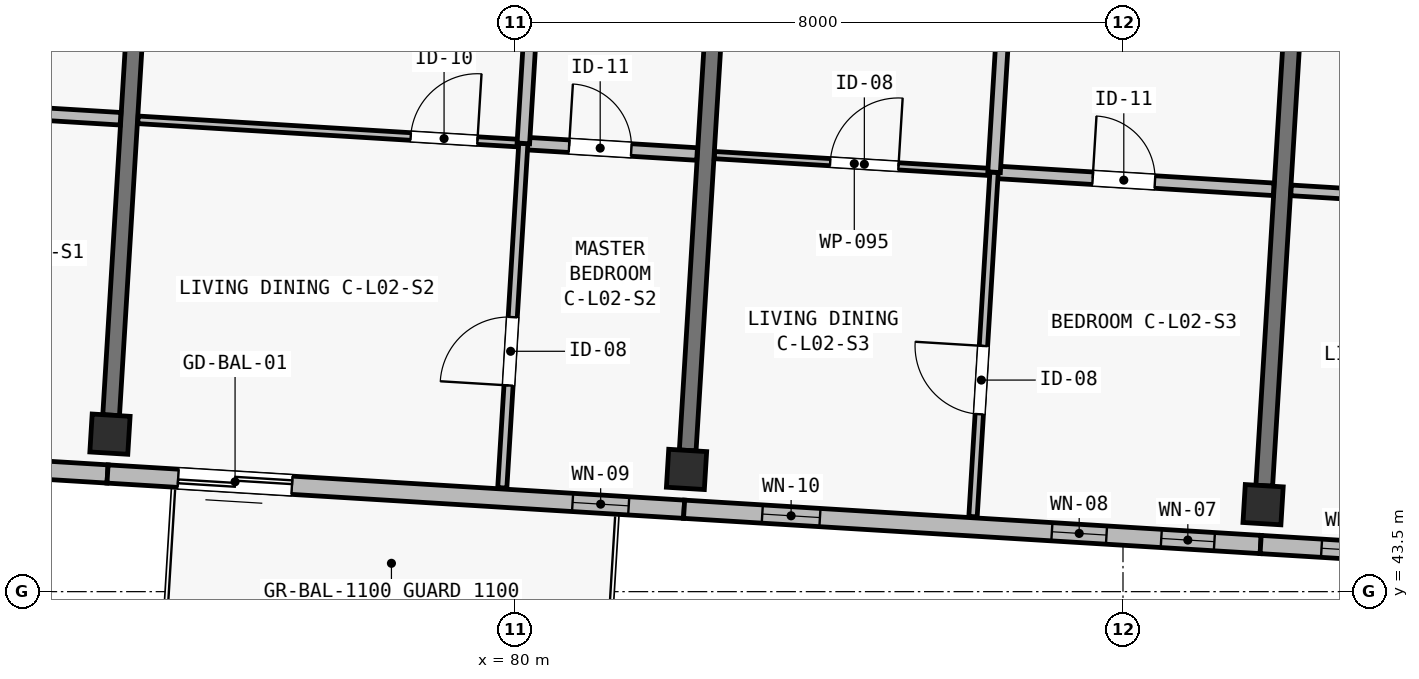
"""IFC4 building model, lengths in metres.
Left out: names, types, materials, properties, quantities, classifications, styles, units other than length and angle.
Written with IfcOpenShell. Run it as: python <this file> out.ifc"""

import sys

from ifc_helpers import new_model, si_unit, direction, frame, frame_2d, origin, origin_2d, place, context, subcontext, project, spatial, rectangle, extrude, element, fill, save


model = new_model("IFC4")
c1 = context("Model", 3, precision=1e-05, world=origin(), true_north=direction((0.0, 1.0)))
c2 = subcontext(c1, "Body", "Model", "MODEL_VIEW")
j1 = project(units=[si_unit("LENGTHUNIT", "METRE"), si_unit("PLANEANGLEUNIT", "RADIAN")], contexts=[c1])
p1 = place(None, origin())
s1 = spatial("IfcSite", under=j1, at=p1, CompositionType="ELEMENT")
p2 = place(p1, origin())
s2 = spatial("IfcBuilding", under=s1, at=p2, CompositionType="ELEMENT")
p3 = place(p2, frame((0.0, 0.0, 8.4)))
s3 = spatial("IfcBuildingStorey", under=s2, at=p3, CompositionType="ELEMENT", Elevation=8.4)
for number, where, z_axis, x_axis in (
    (1, (74.672, 45.572, 0.0), (0.0, 0.0, 1.0), (0.998, -0.061, 0.0)),
    (2, (82.258, 45.108, 0.0), (0.0, 0.0, 1.0), (0.998, -0.061, 0.0)),
    (3, (89.843, 44.644, 0.0), (0.0, 0.0, 1.0), (0.998, -0.061, 0.0)),
):
    element("IfcColumn", number, at=place(p3, frame(where, z_axis=z_axis, x_axis=x_axis)), inside=s3, PredefinedType="COLUMN", context=c2, shape_type="SweptSolid", body=[
        extrude(rectangle(XDim=0.5, YDim=0.5, at=origin_2d()), origin(), (0.0, 0.0, 1.0), 3.25),
    ])
p4 = place(p3, frame((74.687, 45.822, 0.0), z_axis=(0.0, 0.0, 1.0), x_axis=(0.061033859059, 0.99813569621, 0.0)))
e4 = element("IfcWall", 4, at=p4, inside=s3, PredefinedType="SHEAR", context=c2, shape_type="SweptSolid", body=[
    extrude(rectangle(XDim=7.1, YDim=0.22, at=frame_2d((3.55, 0.0))), origin(), (0.0, 0.0, 1.0), 2.5),
])
p5 = place(p3, frame((82.273, 45.358, 0.0), z_axis=(0.0, 0.0, 1.0), x_axis=(0.061070212127, 0.998133472633, 0.0)))
e5 = element("IfcWall", 5, at=p5, inside=s3, PredefinedType="SHEAR", context=c2, shape_type="SweptSolid", body=[
    extrude(rectangle(XDim=7.1, YDim=0.22, at=frame_2d((3.55, 0.0))), origin(), (0.0, 0.0, 1.0), 2.5),
])
p6 = place(p3, frame((89.859, 44.894, 0.0), z_axis=(0.0, 0.0, 1.0), x_axis=(0.061033859059, 0.99813569621, 0.0)))
e6 = element("IfcWall", 6, at=p6, inside=s3, PredefinedType="SHEAR", context=c2, shape_type="SweptSolid", body=[
    extrude(rectangle(XDim=7.1, YDim=0.22, at=frame_2d((3.55, 0.0))), origin(), (0.0, 0.0, 1.0), 2.5),
])
p7 = place(p3, frame((74.64, 45.048, 0.0), z_axis=(0.0, 0.0, 1.0), x_axis=(-0.998135669243, 0.061034300063, 0.0)))
e7 = element("IfcWall", 7, at=p7, inside=s3, PredefinedType="SOLIDWALL", context=c2, shape_type="SweptSolid", body=[
    extrude(rectangle(XDim=7.6, YDim=0.24, at=frame_2d((3.8, 0.0))), origin(), (0.0, 0.0, 1.0), 3.0),
])
p8 = place(p7, frame((1.749, 0.0, 0.42)))
e8 = element("IfcOpeningElement", 8, at=p8, cuts=e7, PredefinedType="OPENING", context=c2, shape_type="SweptSolid", body=[
    extrude(rectangle(XDim=0.8, YDim=2.3, at=frame_2d((0.4, 1.15))), frame((0.0, 0.135, 0.0), z_axis=(0.0, -1.0, 0.0), x_axis=(1.0, 0.0, 0.0)), (0.0, 0.0, 1.0), 0.27),
])
p9 = place(p7, frame((5.04, 0.0, 0.42)))
e9 = element("IfcOpeningElement", 9, at=p9, cuts=e7, PredefinedType="OPENING", context=c2, shape_type="SweptSolid", body=[
    extrude(rectangle(XDim=0.86, YDim=2.36, at=frame_2d((0.43, 1.18))), frame((0.0, 0.135, 0.0), z_axis=(0.0, -1.0, 0.0), x_axis=(1.0, 0.0, 0.0)), (0.0, 0.0, 1.0), 0.27),
])
p10 = place(p3, frame((82.225, 44.584, 0.0), z_axis=(0.0, 0.0, 1.0), x_axis=(-0.998133591969, 0.061068261669, 0.0)))
e10 = element("IfcWall", 10, at=p10, inside=s3, PredefinedType="SOLIDWALL", context=c2, shape_type="SweptSolid", body=[
    extrude(rectangle(XDim=7.6, YDim=0.24, at=frame_2d((3.8, 0.0))), origin(), (0.0, 0.0, 1.0), 3.0),
])
p11 = place(p10, frame((5.169, 0.0, 0.0)))
e11 = element("IfcOpeningElement", 11, at=p11, cuts=e10, PredefinedType="OPENING", context=c2, shape_type="SweptSolid", body=[
    extrude(rectangle(XDim=1.5, YDim=2.12, at=frame_2d((0.75, 1.06))), frame((0.0, 0.135, 0.0), z_axis=(0.0, -1.0, 0.0), x_axis=(1.0, 0.0, 0.0)), (0.0, 0.0, 1.0), 0.27),
])
p12 = place(p10, frame((0.73, 0.0, 0.46)))
e12 = element("IfcOpeningElement", 12, at=p12, cuts=e10, PredefinedType="OPENING", context=c2, shape_type="SweptSolid", body=[
    extrude(rectangle(XDim=0.74, YDim=2.26, at=frame_2d((0.37, 1.13))), frame((0.0, 0.135, 0.0), z_axis=(0.0, -1.0, 0.0), x_axis=(1.0, 0.0, 0.0)), (0.0, 0.0, 1.0), 0.27),
])
p13 = place(p3, frame((89.811, 44.12, 0.0), z_axis=(0.0, 0.0, 1.0), x_axis=(-0.998135669243, 0.061034300063, 0.0)))
e13 = element("IfcWall", 13, at=p13, inside=s3, PredefinedType="SOLIDWALL", context=c2, shape_type="SweptSolid", body=[
    extrude(rectangle(XDim=7.6, YDim=0.24, at=frame_2d((3.8, 0.0))), origin(), (0.0, 0.0, 1.0), 3.0),
])
p14 = place(p13, frame((0.61, 0.0, 0.5)))
e14 = element("IfcOpeningElement", 14, at=p14, cuts=e13, PredefinedType="OPENING", context=c2, shape_type="SweptSolid", body=[
    extrude(rectangle(XDim=0.7, YDim=2.36, at=frame_2d((0.35, 1.18))), frame((0.0, 0.135, 0.0), z_axis=(0.0, -1.0, 0.0), x_axis=(1.0, 0.0, 0.0)), (0.0, 0.0, 1.0), 0.27),
])
p15 = place(p13, frame((2.032, 0.0, 0.42)))
e15 = element("IfcOpeningElement", 15, at=p15, cuts=e13, PredefinedType="OPENING", context=c2, shape_type="SweptSolid", body=[
    extrude(rectangle(XDim=0.72, YDim=2.16, at=frame_2d((0.36, 1.08))), frame((0.0, 0.135, 0.0), z_axis=(0.0, -1.0, 0.0), x_axis=(1.0, 0.0, 0.0)), (0.0, 0.0, 1.0), 0.27),
])
p16 = place(p13, frame((5.809, 0.0, 0.52)))
e16 = element("IfcOpeningElement", 16, at=p16, cuts=e13, PredefinedType="OPENING", context=c2, shape_type="SweptSolid", body=[
    extrude(rectangle(XDim=0.76, YDim=2.34, at=frame_2d((0.38, 1.17))), frame((0.0, 0.135, 0.0), z_axis=(0.0, -1.0, 0.0), x_axis=(1.0, 0.0, 0.0)), (0.0, 0.0, 1.0), 0.27),
])
p17 = place(p3, frame((97.397, 43.656, 0.0), z_axis=(0.0, 0.0, 1.0), x_axis=(-0.998135549572, 0.061036257095, 0.0)))
e17 = element("IfcWall", 17, at=p17, inside=s3, PredefinedType="SOLIDWALL", context=c2, shape_type="SweptSolid", body=[
    extrude(rectangle(XDim=7.6, YDim=0.24, at=frame_2d((3.8, 0.0))), origin(), (0.0, 0.0, 1.0), 3.0),
])
p18 = place(p17, frame((1.544, 0.0, 0.42)))
e18 = element("IfcOpeningElement", 18, at=p18, cuts=e17, PredefinedType="OPENING", context=c2, shape_type="SweptSolid", body=[
    extrude(rectangle(XDim=0.8, YDim=2.3, at=frame_2d((0.4, 1.15))), frame((0.0, 0.135, 0.0), z_axis=(0.0, -1.0, 0.0), x_axis=(1.0, 0.0, 0.0)), (0.0, 0.0, 1.0), 0.27),
])
p19 = place(p17, frame((5.938, 0.0, 0.42)))
e19 = element("IfcOpeningElement", 19, at=p19, cuts=e17, PredefinedType="OPENING", context=c2, shape_type="SweptSolid", body=[
    extrude(rectangle(XDim=0.86, YDim=2.36, at=frame_2d((0.43, 1.18))), frame((0.0, 0.135, 0.0), z_axis=(0.0, -1.0, 0.0), x_axis=(1.0, 0.0, 0.0)), (0.0, 0.0, 1.0), 0.27),
])
p20 = place(p3, frame((71.132, 49.946, 0.0), z_axis=(0.0, 0.0, 1.0), x_axis=(0.998136719672, -0.061017119263, 0.0)))
e20 = element("IfcWall", 20, at=p20, inside=s3, PredefinedType="PLUMBINGWALL", context=c2, shape_type="SweptSolid", body=[
    extrude(rectangle(XDim=3.685, YDim=0.165, at=frame_2d((1.843, 0.0))), origin(), (0.0, 0.0, 1.0), 2.97),
])
p21 = place(p20, frame((1.3, 0.0, 0.0)))
e21 = element("IfcOpeningElement", 21, at=p21, cuts=e20, PredefinedType="OPENING", context=c2, shape_type="SweptSolid", body=[
    extrude(rectangle(XDim=0.82, YDim=2.08, at=frame_2d((0.41, 1.04))), frame((0.0, 0.097, 0.0), z_axis=(0.0, -1.0, 0.0), x_axis=(1.0, 0.0, 0.0)), (0.0, 0.0, 1.0), 0.195),
])
p22 = place(p3, frame((75.04, 49.707, 0.0), z_axis=(0.0, 0.0, 1.0), x_axis=(0.998135637207, -0.061034823981, 0.0)))
e22 = element("IfcWall", 22, at=p22, inside=s3, PredefinedType="PARTITIONING", context=c2, shape_type="SweptSolid", body=[
    extrude(rectangle(XDim=5.08, YDim=0.1, at=frame_2d((2.54, 0.0))), origin(), (0.0, 0.0, 1.0), 2.97),
])
p23 = place(p22, frame((3.595, 0.0, 0.0)))
e23 = element("IfcOpeningElement", 23, at=p23, cuts=e22, PredefinedType="OPENING", context=c2, shape_type="SweptSolid", body=[
    extrude(rectangle(XDim=0.88, YDim=2.1, at=frame_2d((0.44, 1.05))), frame((0.0, 0.065, 0.0), z_axis=(0.0, -1.0, 0.0), x_axis=(1.0, 0.0, 0.0)), (0.0, 0.0, 1.0), 0.13),
])
p24 = place(p3, frame((80.11, 49.397, 0.0), z_axis=(0.0, 0.0, 1.0), x_axis=(0.99813222782, -0.061090553999, 0.0)))
e24 = element("IfcWall", 24, at=p24, inside=s3, PredefinedType="PLUMBINGWALL", context=c2, shape_type="SweptSolid", body=[
    extrude(rectangle(XDim=2.29, YDim=0.165, at=frame_2d((1.145, 0.0))), origin(), (0.0, 0.0, 1.0), 2.97),
])
p25 = place(p24, frame((0.603, 0.0, 0.0)))
e25 = element("IfcOpeningElement", 25, at=p25, cuts=e24, PredefinedType="OPENING", context=c2, shape_type="SweptSolid", body=[
    extrude(rectangle(XDim=0.82, YDim=2.08, at=frame_2d((0.41, 1.04))), frame((0.0, 0.097, 0.0), z_axis=(0.0, -1.0, 0.0), x_axis=(1.0, 0.0, 0.0)), (0.0, 0.0, 1.0), 0.195),
])
p26 = place(p3, frame((79.833, 44.866, 0.0), z_axis=(0.0, 0.0, 1.0), x_axis=(0.061035713941, 0.998135582786, 0.0)))
e26 = element("IfcWall", 26, at=p26, inside=s3, PredefinedType="PARTITIONING", context=c2, shape_type="SweptSolid", body=[
    extrude(rectangle(XDim=4.54, YDim=0.12, at=frame_2d((2.27, 0.0))), origin(), (0.0, 0.0, 1.0), 2.97),
])
p27 = place(p26, frame((1.35, 0.0, 0.0)))
e27 = element("IfcOpeningElement", 27, at=p27, cuts=e26, PredefinedType="OPENING", context=c2, shape_type="SweptSolid", body=[
    extrude(rectangle(XDim=0.9, YDim=2.1, at=frame_2d((0.45, 1.05))), frame((0.0, 0.075, 0.0), z_axis=(0.0, -1.0, 0.0), x_axis=(1.0, 0.0, 0.0)), (0.0, 0.0, 1.0), 0.15),
])
p28 = place(p3, frame((80.11, 49.397, 0.0), z_axis=(0.0, 0.0, 1.0), x_axis=(0.061066453301, 0.998133702608, 0.0)))
e28 = element("IfcWall", 28, at=p28, inside=s3, PredefinedType="PLUMBINGWALL", context=c2, shape_type="SweptSolid", body=[
    extrude(rectangle(XDim=3.87, YDim=0.165, at=frame_2d((1.935, 0.0))), origin(), (0.0, 0.0, 1.0), 2.97),
])
p29 = place(p3, frame((82.625, 49.243, 0.0), z_axis=(0.0, 0.0, 1.0), x_axis=(0.998132682596, -0.061083123148, 0.0)))
e29 = element("IfcWall", 29, at=p29, inside=s3, PredefinedType="PARTITIONING", context=c2, shape_type="SweptSolid", body=[
    extrude(rectangle(XDim=3.685, YDim=0.095, at=frame_2d((1.843, 0.0))), origin(), (0.0, 0.0, 1.0), 2.97),
])
p30 = place(p29, frame((1.525, 0.0, 0.0)))
e30 = element("IfcOpeningElement", 30, at=p30, cuts=e29, PredefinedType="OPENING", context=c2, shape_type="SweptSolid", body=[
    extrude(rectangle(XDim=0.9, YDim=2.1, at=frame_2d((0.45, 1.05))), frame((0.0, 0.062, 0.0), z_axis=(0.0, -1.0, 0.0), x_axis=(1.0, 0.0, 0.0)), (0.0, 0.0, 1.0), 0.125),
])
p31 = place(p3, frame((86.304, 49.018, 0.0), z_axis=(0.0, 0.0, 1.0), x_axis=(0.998136719672, -0.061017119263, 0.0)))
e31 = element("IfcWall", 31, at=p31, inside=s3, PredefinedType="PLUMBINGWALL", context=c2, shape_type="SweptSolid", body=[
    extrude(rectangle(XDim=3.685, YDim=0.165, at=frame_2d((1.843, 0.0))), origin(), (0.0, 0.0, 1.0), 2.97),
])
p32 = place(p31, frame((1.3, 0.0, 0.0)))
e32 = element("IfcOpeningElement", 32, at=p32, cuts=e31, PredefinedType="OPENING", context=c2, shape_type="SweptSolid", body=[
    extrude(rectangle(XDim=0.82, YDim=2.08, at=frame_2d((0.41, 1.04))), frame((0.0, 0.097, 0.0), z_axis=(0.0, -1.0, 0.0), x_axis=(1.0, 0.0, 0.0)), (0.0, 0.0, 1.0), 0.195),
])
p33 = place(p3, frame((86.027, 44.487, 0.0), z_axis=(0.0, 0.0, 1.0), x_axis=(0.061035713941, 0.998135582786, 0.0)))
e33 = element("IfcWall", 33, at=p33, inside=s3, PredefinedType="PARTITIONING", context=c2, shape_type="SweptSolid", body=[
    extrude(rectangle(XDim=4.54, YDim=0.11, at=frame_2d((2.27, 0.0))), origin(), (0.0, 0.0, 1.0), 2.97),
])
p34 = place(p33, frame((1.35, 0.0, 0.0)))
e34 = element("IfcOpeningElement", 34, at=p34, cuts=e33, PredefinedType="OPENING", context=c2, shape_type="SweptSolid", body=[
    extrude(rectangle(XDim=0.9, YDim=2.1, at=frame_2d((0.45, 1.05))), frame((0.0, 0.07, 0.0), z_axis=(0.0, -1.0, 0.0), x_axis=(1.0, 0.0, 0.0)), (0.0, 0.0, 1.0), 0.14),
])
p35 = place(p3, frame((86.304, 49.018, 0.0), z_axis=(0.0, 0.0, 1.0), x_axis=(0.061066453301, 0.998133702608, 0.0)))
e35 = element("IfcWall", 35, at=p35, inside=s3, PredefinedType="PLUMBINGWALL", context=c2, shape_type="SweptSolid", body=[
    extrude(rectangle(XDim=3.87, YDim=0.165, at=frame_2d((1.935, 0.0))), origin(), (0.0, 0.0, 1.0), 2.97),
])
p36 = place(p3, frame((90.211, 48.779, 0.0), z_axis=(0.0, 0.0, 1.0), x_axis=(0.998136719672, -0.061017119263, 0.0)))
e36 = element("IfcWall", 36, at=p36, inside=s3, PredefinedType="PARTITIONING", context=c2, shape_type="SweptSolid", body=[
    extrude(rectangle(XDim=3.685, YDim=0.14, at=frame_2d((1.843, 0.0))), origin(), (0.0, 0.0, 1.0), 2.97),
])
p37 = place(p36, frame((1.525, 0.0, 0.0)))
e37 = element("IfcOpeningElement", 37, at=p37, cuts=e36, PredefinedType="OPENING", context=c2, shape_type="SweptSolid", body=[
    extrude(rectangle(XDim=0.9, YDim=2.1, at=frame_2d((0.45, 1.05))), frame((0.0, 0.085, 0.0), z_axis=(0.0, -1.0, 0.0), x_axis=(1.0, 0.0, 0.0)), (0.0, 0.0, 1.0), 0.17),
])
p38 = place(p11, origin())
e38 = element("IfcDoor", 38, at=p38, inside=s3, OperationType="SLIDING_TO_RIGHT", PredefinedType="DOOR", context=c2, shape_type="SweptSolid", body=[
    extrude(rectangle(XDim=1.5, YDim=2.12, at=frame_2d((0.75, 1.06))), frame((0.0, 0.025, 0.0), z_axis=(0.0, -1.0, 0.0), x_axis=(1.0, 0.0, 0.0)), (0.0, 0.0, 1.0), 0.05),
])
fill(e11, e38)
p39 = place(p12, origin())
e39 = element("IfcWindow", 39, at=p39, inside=s3, PartitioningType="SINGLE_PANEL", PredefinedType="WINDOW", context=c2, shape_type="SweptSolid", body=[
    extrude(rectangle(XDim=0.74, YDim=2.26, at=frame_2d((0.37, 1.13))), frame((0.0, 0.03, 0.0), z_axis=(0.0, -1.0, 0.0), x_axis=(1.0, 0.0, 0.0)), (0.0, 0.0, 1.0), 0.06),
])
fill(e12, e39)
p40 = place(p14, origin())
e40 = element("IfcWindow", 40, at=p40, inside=s3, PartitioningType="SINGLE_PANEL", PredefinedType="WINDOW", context=c2, shape_type="SweptSolid", body=[
    extrude(rectangle(XDim=0.7, YDim=2.36, at=frame_2d((0.35, 1.18))), frame((0.0, 0.03, 0.0), z_axis=(0.0, -1.0, 0.0), x_axis=(1.0, 0.0, 0.0)), (0.0, 0.0, 1.0), 0.06),
])
fill(e14, e40)
p41 = place(p15, origin())
e41 = element("IfcWindow", 41, at=p41, inside=s3, PartitioningType="SINGLE_PANEL", PredefinedType="WINDOW", context=c2, shape_type="SweptSolid", body=[
    extrude(rectangle(XDim=0.72, YDim=2.16, at=frame_2d((0.36, 1.08))), frame((0.0, 0.03, 0.0), z_axis=(0.0, -1.0, 0.0), x_axis=(1.0, 0.0, 0.0)), (0.0, 0.0, 1.0), 0.06),
])
fill(e15, e41)
p42 = place(p16, origin())
e42 = element("IfcWindow", 42, at=p42, inside=s3, PartitioningType="SINGLE_PANEL", PredefinedType="WINDOW", context=c2, shape_type="SweptSolid", body=[
    extrude(rectangle(XDim=0.76, YDim=2.34, at=frame_2d((0.38, 1.17))), frame((0.0, 0.03, 0.0), z_axis=(0.0, -1.0, 0.0), x_axis=(1.0, 0.0, 0.0)), (0.0, 0.0, 1.0), 0.06),
])
fill(e16, e42)
p43 = place(p19, origin())
e43 = element("IfcWindow", 43, at=p43, inside=s3, PartitioningType="SINGLE_PANEL", PredefinedType="WINDOW", context=c2, shape_type="SweptSolid", body=[
    extrude(rectangle(XDim=0.86, YDim=2.36, at=frame_2d((0.43, 1.18))), frame((0.0, 0.03, 0.0), z_axis=(0.0, -1.0, 0.0), x_axis=(1.0, 0.0, 0.0)), (0.0, 0.0, 1.0), 0.06),
])
fill(e19, e43)
p44 = place(p23, origin())
e44 = element("IfcDoor", 44, at=p44, inside=s3, OperationType="SINGLE_SWING_RIGHT", PredefinedType="DOOR", context=c2, shape_type="SweptSolid", body=[
    extrude(rectangle(XDim=0.88, YDim=2.1, at=frame_2d((0.44, 1.05))), frame((0.0, 0.025, 0.0), z_axis=(0.0, -1.0, 0.0), x_axis=(1.0, 0.0, 0.0)), (0.0, 0.0, 1.0), 0.05),
])
fill(e23, e44)
p45 = place(p25, origin())
e45 = element("IfcDoor", 45, at=p45, inside=s3, OperationType="SINGLE_SWING_LEFT", PredefinedType="DOOR", context=c2, shape_type="SweptSolid", body=[
    extrude(rectangle(XDim=0.82, YDim=2.08, at=frame_2d((0.41, 1.04))), frame((0.0, 0.025, 0.0), z_axis=(0.0, -1.0, 0.0), x_axis=(1.0, 0.0, 0.0)), (0.0, 0.0, 1.0), 0.05),
])
fill(e25, e45)
p46 = place(p27, origin())
e46 = element("IfcDoor", 46, at=p46, inside=s3, OperationType="SINGLE_SWING_LEFT", PredefinedType="DOOR", context=c2, shape_type="SweptSolid", body=[
    extrude(rectangle(XDim=0.9, YDim=2.1, at=frame_2d((0.45, 1.05))), frame((0.0, 0.025, 0.0), z_axis=(0.0, -1.0, 0.0), x_axis=(1.0, 0.0, 0.0)), (0.0, 0.0, 1.0), 0.05),
])
fill(e27, e46)
p47 = place(p30, origin())
e47 = element("IfcDoor", 47, at=p47, inside=s3, OperationType="SINGLE_SWING_RIGHT", PredefinedType="DOOR", context=c2, shape_type="SweptSolid", body=[
    extrude(rectangle(XDim=0.9, YDim=2.1, at=frame_2d((0.45, 1.05))), frame((0.0, 0.025, 0.0), z_axis=(0.0, -1.0, 0.0), x_axis=(1.0, 0.0, 0.0)), (0.0, 0.0, 1.0), 0.05),
])
fill(e30, e47)
p48 = place(p32, origin())
e48 = element("IfcDoor", 48, at=p48, inside=s3, OperationType="SINGLE_SWING_LEFT", PredefinedType="DOOR", context=c2, shape_type="SweptSolid", body=[
    extrude(rectangle(XDim=0.82, YDim=2.08, at=frame_2d((0.41, 1.04))), frame((0.0, 0.025, 0.0), z_axis=(0.0, -1.0, 0.0), x_axis=(1.0, 0.0, 0.0)), (0.0, 0.0, 1.0), 0.05),
])
fill(e32, e48)
p49 = place(p34, origin())
e49 = element("IfcDoor", 49, at=p49, inside=s3, OperationType="SINGLE_SWING_RIGHT", PredefinedType="DOOR", context=c2, shape_type="SweptSolid", body=[
    extrude(rectangle(XDim=0.9, YDim=2.1, at=frame_2d((0.45, 1.05))), frame((0.0, 0.025, 0.0), z_axis=(0.0, -1.0, 0.0), x_axis=(1.0, 0.0, 0.0)), (0.0, 0.0, 1.0), 0.05),
])
fill(e34, e49)
save(model, sys.argv[1])
